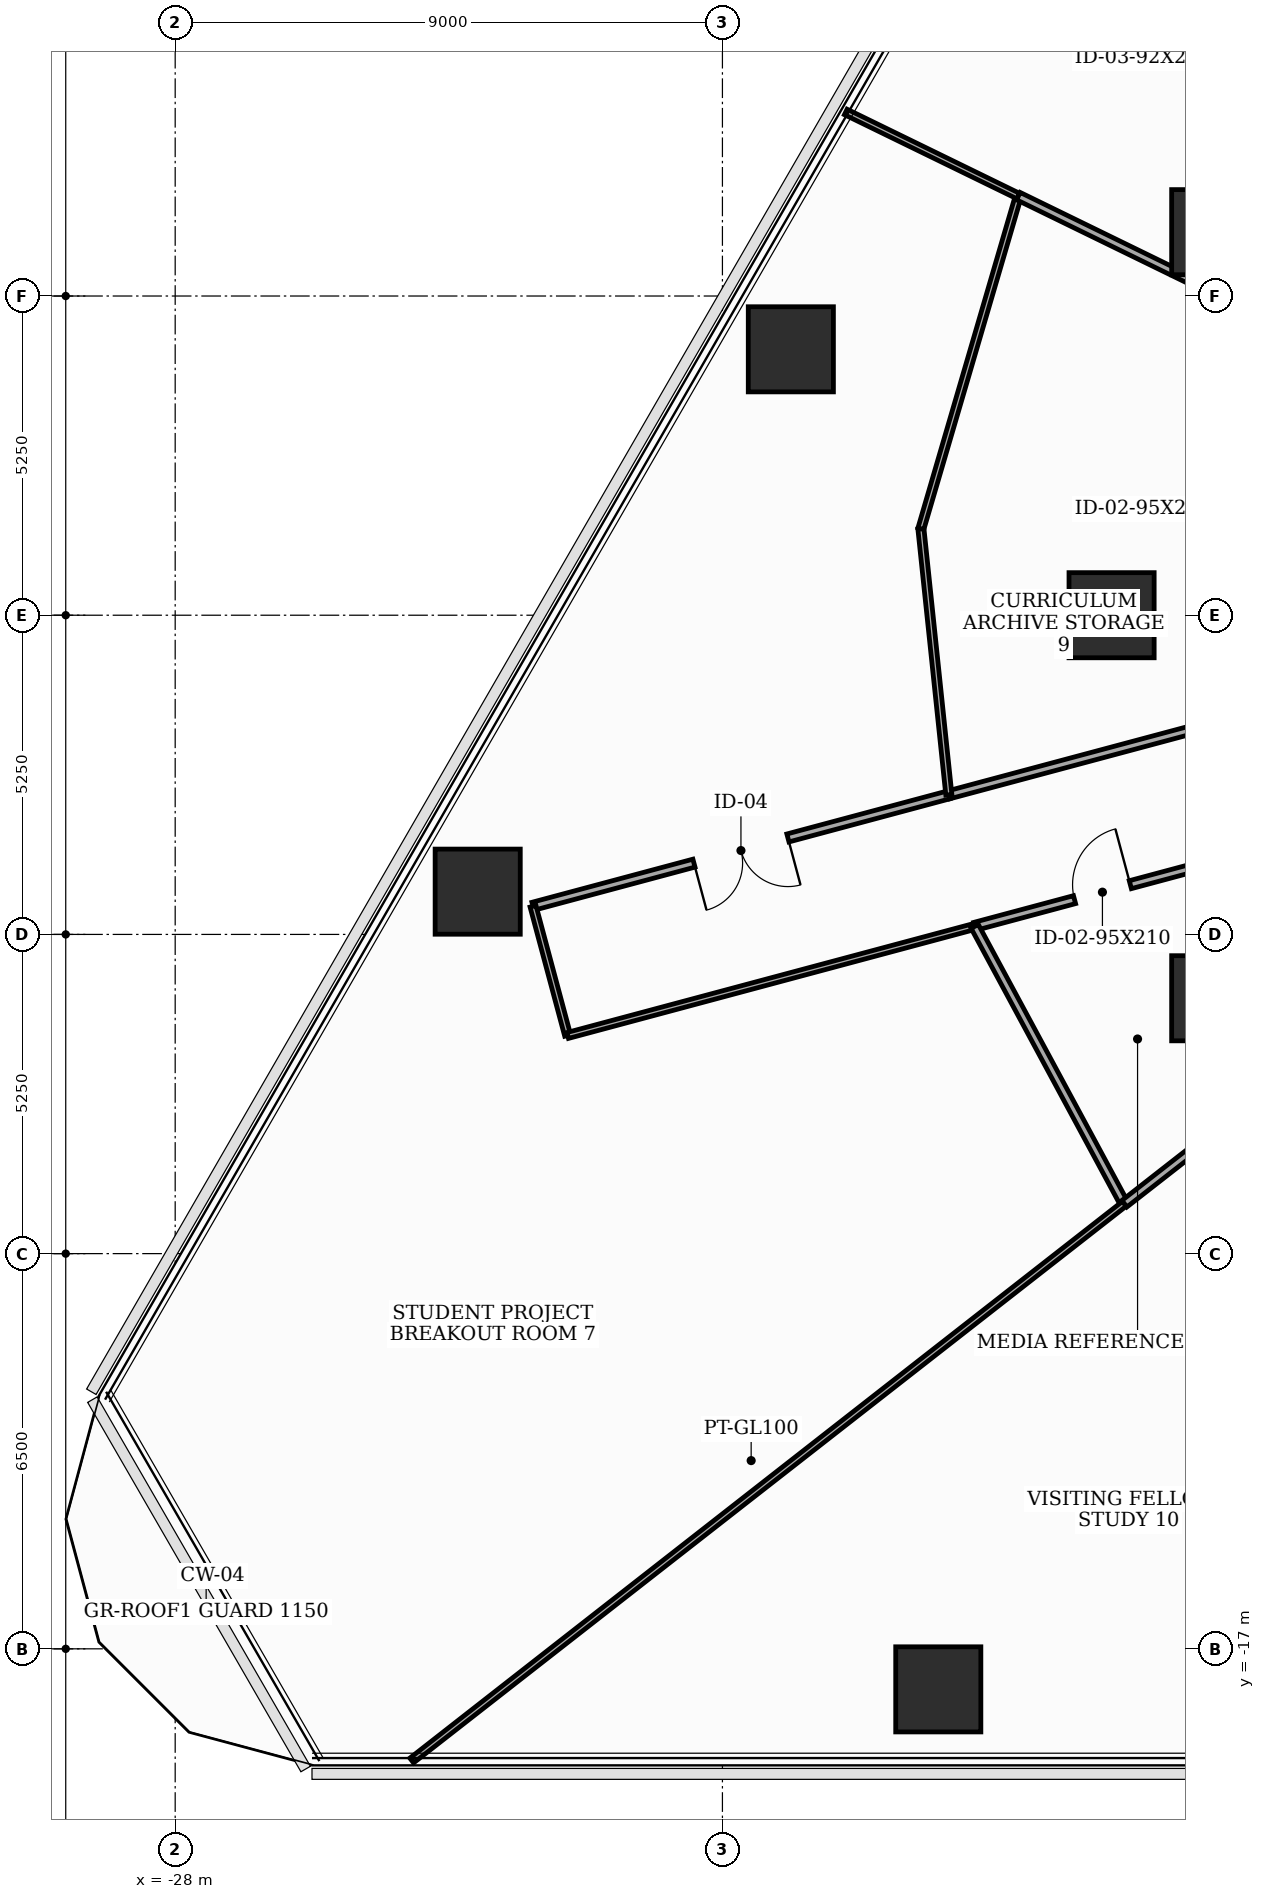
"""IFC4 building model, lengths in metres.
Left out: names, types, materials, properties, quantities, classifications, styles, units other than length and angle.
Written with IfcOpenShell. Run it as: python <this file> out.ifc"""

import sys

from ifc_helpers import new_model, si_unit, direction, frame, frame_2d, origin, origin_2d, place, context, subcontext, project, spatial, rectangle, extrude, element, fill, save


model = new_model("IFC4")
c1 = context("Model", 3, precision=1e-05, world=origin(), true_north=direction((0.0, 1.0)))
c2 = subcontext(c1, "Body", "Model", "MODEL_VIEW")
j1 = project(units=[si_unit("LENGTHUNIT", "METRE"), si_unit("PLANEANGLEUNIT", "RADIAN")], contexts=[c1])
p1 = place(None, origin())
s1 = spatial("IfcSite", under=j1, at=p1, CompositionType="ELEMENT")
p2 = place(p1, origin())
s2 = spatial("IfcBuilding", under=s1, at=p2, CompositionType="ELEMENT")
p3 = place(p2, frame((0.0, 0.0, 51.9)))
s3 = spatial("IfcBuildingStorey", under=s2, at=p3, CompositionType="ELEMENT", Elevation=51.9)
for number, where, z_axis, x_axis in (
    (1, (-10.912, 6.3, 0.0), (0.0, 0.0, 1.0), (1.0, 0.0, 0.0)),
    (2, (-12.6, 0.0, 0.0), (0.0, 0.0, 1.0), (1.0, 0.0, 0.0)),
    (3, (-10.912, -6.3, 0.0), (0.0, 0.0, 1.0), (1.0, 0.0, 0.0)),
    (4, (-15.45, -17.667, 0.0), (0.0, 0.0, 1.0), (1.0, 0.0, 0.0)),
    (5, (-17.875, 4.373, 0.0), (0.0, 0.0, 1.0), (1.0, 0.0, 0.0)),
    (6, (-23.025, -4.547, 0.0), (0.0, 0.0, 1.0), (1.0, 0.0, 0.0)),
):
    element("IfcColumn", number, at=place(p3, frame(where, z_axis=z_axis, x_axis=x_axis)), inside=s3, PredefinedType="COLUMN", context=c2, shape_type="SweptSolid", body=[
        extrude(rectangle(XDim=1.4, YDim=1.4, at=origin_2d()), origin(), (0.0, 0.0, 1.0), 3.7),
    ])
p4 = place(p3, frame((-14.851, -5.118, 0.0), z_axis=(0.0, 0.0, 1.0), x_axis=(0.965909963178, 0.258878239783, 0.0)))
e7 = element("IfcWall", 7, at=p4, inside=s3, PredefinedType="PARTITIONING", context=c2, shape_type="SweptSolid", body=[
    extrude(rectangle(XDim=4.349, YDim=0.135, at=frame_2d((2.175, 0.0))), origin(), (0.0, 0.0, 1.0), 2.785),
])
p5 = place(p4, frame((1.7, 0.0, 0.0)))
e8 = element("IfcOpeningElement", 8, at=p5, cuts=e7, PredefinedType="OPENING", context=c2, shape_type="SweptSolid", body=[
    extrude(rectangle(XDim=0.95, YDim=2.1, at=frame_2d((0.475, 1.05))), frame((0.0, 0.077, 0.0), z_axis=(0.0, -1.0, 0.0), x_axis=(1.0, 0.0, 0.0)), (0.0, 0.0, 1.0), 0.155),
])
p6 = place(p3, frame((-15.276, -2.954, 0.0), z_axis=(0.0, 0.0, 1.0), x_axis=(-0.965909107385, -0.258881432844, 0.0)))
e9 = element("IfcWall", 9, at=p6, inside=s3, PredefinedType="PARTITIONING", context=c2, shape_type="SweptSolid", body=[
    extrude(rectangle(XDim=7.081, YDim=0.135, at=frame_2d((3.54, 0.0))), origin(), (0.0, 0.0, 1.0), 2.085),
])
p7 = place(p6, frame((2.74, 0.0, 0.0)))
e10 = element("IfcOpeningElement", 10, at=p7, cuts=e9, PredefinedType="OPENING", context=c2, shape_type="SweptSolid", body=[
    extrude(rectangle(XDim=1.6, YDim=2.035, at=frame_2d((0.8, 1.018))), frame((0.0, 0.077, 0.0), z_axis=(0.0, -1.0, 0.0), x_axis=(1.0, 0.0, 0.0)), (0.0, 0.0, 1.0), 0.155),
])
p8 = place(p3, frame((-22.115, -4.787, 0.0), z_axis=(0.0, 0.0, 1.0), x_axis=(0.259105843213, -0.965848933329, 0.0)))
e11 = element("IfcWall", 11, at=p8, inside=s3, PredefinedType="MOVABLE", context=c2, shape_type="SweptSolid", body=[
    extrude(rectangle(XDim=2.2, YDim=0.1, at=frame_2d((1.1, 0.0))), origin(), (0.0, 0.0, 1.0), 2.085),
])
p9 = place(p3, frame((-21.545, -6.912, 0.0), z_axis=(0.0, 0.0, 1.0), x_axis=(0.965904958487, 0.258896912245, 0.0)))
e12 = element("IfcWall", 12, at=p9, inside=s3, PredefinedType="MOVABLE", context=c2, shape_type="SweptSolid", body=[
    extrude(rectangle(XDim=6.93, YDim=0.1, at=frame_2d((3.465, 0.0))), origin(), (0.0, 0.0, 1.0), 2.085),
])
p10 = place(p3, frame((-10.65, -1.715, 0.0), z_axis=(0.0, 0.0, 1.0), x_axis=(-0.965952601708, -0.258719097196, 0.0)))
e13 = element("IfcWall", 13, at=p10, inside=s3, PredefinedType="PARTITIONING", context=c2, shape_type="SweptSolid", body=[
    extrude(rectangle(XDim=4.789, YDim=0.135, at=frame_2d((2.395, 0.0))), origin(), (0.0, 0.0, 1.0), 2.785),
])
p11 = place(p3, frame((-14.851, -5.118, 0.0), z_axis=(0.0, 0.0, 1.0), x_axis=(0.474543506137, -0.880232049395, 0.0)))
e14 = element("IfcWall", 14, at=p11, inside=s3, PredefinedType="PARTITIONING", context=c2, shape_type="SweptSolid", body=[
    extrude(rectangle(XDim=5.184, YDim=0.135, at=frame_2d((2.592, 0.0))), origin(), (0.0, 0.0, 1.0), 2.085),
])
p12 = place(p3, frame((-12.391, -9.681, 0.0), z_axis=(0.0, 0.0, 1.0), x_axis=(0.788124883644, 0.615515367624, 0.0)))
e15 = element("IfcWall", 15, at=p12, inside=s3, PredefinedType="PARTITIONING", context=c2, shape_type="SweptSolid", body=[
    extrude(rectangle(XDim=2.209, YDim=0.135, at=frame_2d((1.104, 0.0))), origin(), (0.0, 0.0, 1.0), 3.5),
])
p13 = place(p3, frame((-15.276, -2.954, 0.0), z_axis=(0.0, 0.0, 1.0), x_axis=(-0.104560622475, 0.994518514774, 0.0)))
e16 = element("IfcWall", 16, at=p13, inside=s3, PredefinedType="MOVABLE", context=c2, shape_type="SweptSolid", body=[
    extrude(rectangle(XDim=4.401, YDim=0.1, at=frame_2d((2.201, 0.0))), origin(), (0.0, 0.0, 1.0), 2.085),
])
p14 = place(p3, frame((-15.736, 1.423, 0.0), z_axis=(0.0, 0.0, 1.0), x_axis=(0.281231672123, 0.959639904649, 0.0)))
e17 = element("IfcWall", 17, at=p14, inside=s3, PredefinedType="MOVABLE", context=c2, shape_type="SweptSolid", body=[
    extrude(rectangle(XDim=5.7, YDim=0.1, at=frame_2d((2.85, 0.0))), origin(), (0.0, 0.0, 1.0), 2.085),
])
p15 = place(p3, frame((-24.11, -18.837, 0.0), z_axis=(0.0, 0.0, 1.0), x_axis=(0.788000479848, 0.615674624911, 0.0)))
e18 = element("IfcWall", 18, at=p15, inside=s3, PredefinedType="MOVABLE", context=c2, shape_type="SweptSolid", body=[
    extrude(rectangle(XDim=14.872, YDim=0.1, at=frame_2d((7.436, 0.0))), origin(), (0.0, 0.0, 1.0), 2.085),
])
p16 = place(p3, frame((-14.133, 6.893, 0.0), z_axis=(0.0, 0.0, 1.0), x_axis=(-0.898789989557, 0.438379464245, 0.0)))
e19 = element("IfcWall", 19, at=p16, inside=s3, PredefinedType="MOVABLE", context=c2, shape_type="SweptSolid", body=[
    extrude(rectangle(XDim=3.158, YDim=0.1, at=frame_2d((1.579, 0.0))), origin(), (0.0, 0.0, 1.0), 2.085),
])
p17 = place(p3, frame((-10.65, 5.194, 0.0), z_axis=(0.0, 0.0, 1.0), x_axis=(-0.898781159743, 0.438397567159, 0.0)))
e20 = element("IfcWall", 20, at=p17, inside=s3, PredefinedType="PARTITIONING", context=c2, shape_type="SweptSolid", body=[
    extrude(rectangle(XDim=3.875, YDim=0.135, at=frame_2d((1.938, 0.0))), origin(), (0.0, 0.0, 1.0), 2.785),
])
p18 = place(p5, origin())
e21 = element("IfcDoor", 21, at=p18, inside=s3, OperationType="SINGLE_SWING_RIGHT", PredefinedType="DOOR", context=c2, shape_type="SweptSolid", body=[
    extrude(rectangle(XDim=0.95, YDim=2.1, at=frame_2d((0.475, 1.05))), frame((0.0, 0.025, 0.0), z_axis=(0.0, -1.0, 0.0), x_axis=(1.0, 0.0, 0.0)), (0.0, 0.0, 1.0), 0.05),
])
fill(e8, e21)
p19 = place(p7, origin())
e22 = element("IfcDoor", 22, at=p19, inside=s3, OperationType="DOUBLE_DOOR_SINGLE_SWING", PredefinedType="DOOR", context=c2, shape_type="SweptSolid", body=[
    extrude(rectangle(XDim=1.6, YDim=2.035, at=frame_2d((0.8, 1.018))), frame((0.0, 0.025, 0.0), z_axis=(0.0, -1.0, 0.0), x_axis=(1.0, 0.0, 0.0)), (0.0, 0.0, 1.0), 0.05),
])
fill(e10, e22)
save(model, sys.argv[1])
